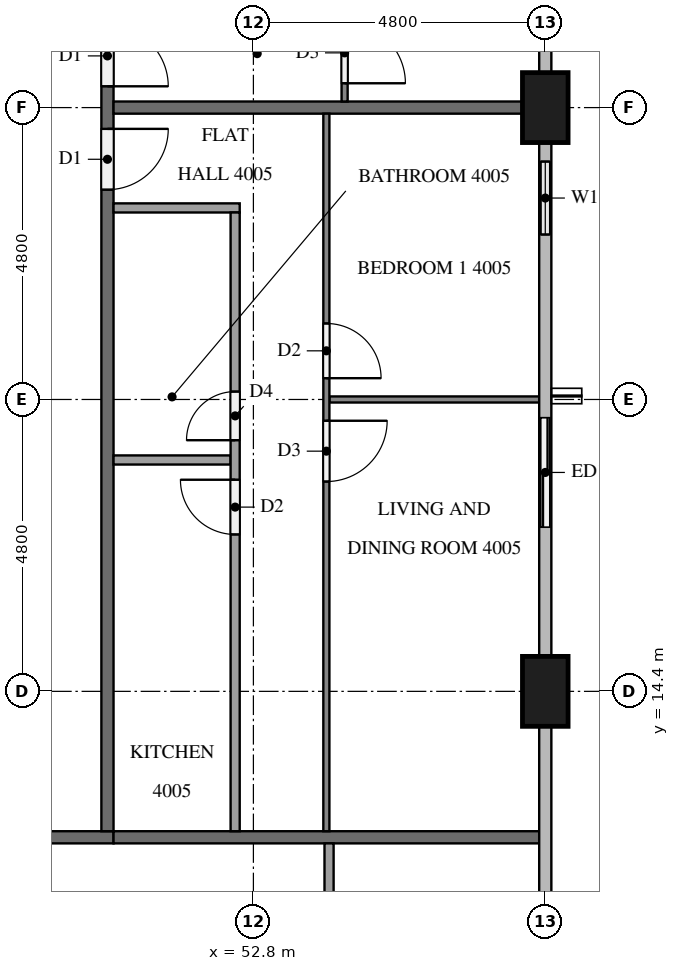
"""IFC4 building model, lengths in metres.
Left out: names, types, materials, properties, quantities, classifications, styles, units other than length and angle.
Written with IfcOpenShell. Run it as: python <this file> out.ifc"""

import sys

from ifc_helpers import new_model, si_unit, direction, frame, frame_2d, origin, origin_2d, place, context, subcontext, project, spatial, rectangle, extrude, element, fill, save


model = new_model("IFC4")
c1 = context("Model", 3, precision=1e-05, world=origin(), true_north=direction((0.0, 1.0)))
c2 = subcontext(c1, "Body", "Model", "MODEL_VIEW")
j1 = project(units=[si_unit("LENGTHUNIT", "METRE"), si_unit("PLANEANGLEUNIT", "RADIAN")], contexts=[c1])
p1 = place(None, origin())
s1 = spatial("IfcSite", under=j1, at=p1, CompositionType="ELEMENT")
p2 = place(p1, origin())
s2 = spatial("IfcBuilding", under=s1, at=p2, CompositionType="ELEMENT")
p3 = place(p2, frame((0.0, 0.0, 156.0)))
s3 = spatial("IfcBuildingStorey", under=s2, at=p3, CompositionType="ELEMENT", Elevation=156.0)
for number, where, z_axis, x_axis in (
    (1, (57.6, 14.4, 0.0), (0.0, 0.0, 1.0), (0.0, 1.0, 0.0)),
    (2, (57.6, 24.0, 0.0), (0.0, 0.0, 1.0), (0.0, 1.0, 0.0)),
):
    element("IfcColumn", number, at=place(p3, frame(where, z_axis=z_axis, x_axis=x_axis)), inside=s3, PredefinedType="COLUMN", context=c2, shape_type="SweptSolid", body=[
        extrude(rectangle(XDim=1.15, YDim=0.75, at=origin_2d()), origin(), (0.0, 0.0, 1.0), 3.2),
    ])
p4 = place(p3, frame((57.6, 16.8, 0.0), z_axis=(0.0, 0.0, 1.0), x_axis=(0.0, 1.0, 0.0)))
e3 = element("IfcWall", 3, at=p4, inside=s3, PredefinedType="SOLIDWALL", context=c2, shape_type="SweptSolid", body=[
    extrude(rectangle(XDim=2.4, YDim=0.15, at=frame_2d((1.2, 0.0))), origin(), (0.0, 0.0, 1.0), 3.2),
])
p5 = place(p4, frame((0.3, 0.0, 0.0)))
e4 = element("IfcOpeningElement", 4, at=p5, cuts=e3, PredefinedType="OPENING", context=c2, shape_type="SweptSolid", body=[
    extrude(rectangle(XDim=1.8, YDim=2.4, at=frame_2d((0.9, 1.2))), frame((0.0, 0.085, 0.0), z_axis=(0.0, -1.0, 0.0), x_axis=(1.0, 0.0, 0.0)), (0.0, 0.0, 1.0), 0.17),
])
p6 = place(p3, frame((57.6, 21.6, 0.0), z_axis=(0.0, 0.0, 1.0), x_axis=(0.0, 1.0, 0.0)))
e5 = element("IfcWall", 5, at=p6, inside=s3, PredefinedType="SOLIDWALL", context=c2, shape_type="SweptSolid", body=[
    extrude(rectangle(XDim=1.825, YDim=0.15, at=frame_2d((0.913, 0.0))), origin(), (0.0, 0.0, 1.0), 3.2),
])
p7 = place(p6, frame((0.312, 0.0, 0.9)))
e6 = element("IfcOpeningElement", 6, at=p7, cuts=e5, PredefinedType="OPENING", context=c2, shape_type="SweptSolid", body=[
    extrude(rectangle(XDim=1.2, YDim=1.4, at=frame_2d((0.6, 0.7))), frame((0.0, 0.085, 0.0), z_axis=(0.0, -1.0, 0.0), x_axis=(1.0, 0.0, 0.0)), (0.0, 0.0, 1.0), 0.17),
])
p8 = place(p3, frame((50.5, 12.0, 0.0), z_axis=(0.0, 0.0, 1.0), x_axis=(-1.0, 0.0, 0.0)))
e7 = element("IfcWall", 7, at=p8, inside=s3, PredefinedType="PARTITIONING", context=c2, shape_type="SweptSolid", body=[
    extrude(rectangle(XDim=38.6, YDim=0.2, at=frame_2d((19.3, 0.0))), origin(), (0.0, 0.0, 1.0), 3.2),
])
p9 = place(p8, frame((36.45, 0.0, 0.0)))
e8 = element("IfcOpeningElement", 8, at=p9, cuts=e7, PredefinedType="OPENING", context=c2, shape_type="SweptSolid", body=[
    extrude(rectangle(XDim=1.0, YDim=2.1, at=frame_2d((0.5, 1.05))), frame((0.0, 0.11, 0.0), z_axis=(0.0, -1.0, 0.0), x_axis=(1.0, 0.0, 0.0)), (0.0, 0.0, 1.0), 0.22),
])
p10 = place(p8, frame((34.75, 0.0, 0.0)))
e9 = element("IfcOpeningElement", 9, at=p10, cuts=e7, PredefinedType="OPENING", context=c2, shape_type="SweptSolid", body=[
    extrude(rectangle(XDim=1.0, YDim=2.1, at=frame_2d((0.5, 1.05))), frame((0.0, 0.11, 0.0), z_axis=(0.0, -1.0, 0.0), x_axis=(1.0, 0.0, 0.0)), (0.0, 0.0, 1.0), 0.22),
])
p11 = place(p8, frame((10.05, 0.0, 0.0)))
e10 = element("IfcOpeningElement", 10, at=p11, cuts=e7, PredefinedType="OPENING", context=c2, shape_type="SweptSolid", body=[
    extrude(rectangle(XDim=1.0, YDim=2.1, at=frame_2d((0.5, 1.05))), frame((0.0, 0.11, 0.0), z_axis=(0.0, -1.0, 0.0), x_axis=(1.0, 0.0, 0.0)), (0.0, 0.0, 1.0), 0.22),
])
p12 = place(p8, frame((8.35, 0.0, 0.0)))
e11 = element("IfcOpeningElement", 11, at=p12, cuts=e7, PredefinedType="OPENING", context=c2, shape_type="SweptSolid", body=[
    extrude(rectangle(XDim=1.0, YDim=2.1, at=frame_2d((0.5, 1.05))), frame((0.0, 0.11, 0.0), z_axis=(0.0, -1.0, 0.0), x_axis=(1.0, 0.0, 0.0)), (0.0, 0.0, 1.0), 0.22),
])
p13 = place(p3, frame((50.4, 40.7, 0.0), z_axis=(0.0, 0.0, 1.0), x_axis=(0.0, -1.0, 0.0)))
e12 = element("IfcWall", 12, at=p13, inside=s3, PredefinedType="PARTITIONING", context=c2, shape_type="SweptSolid", body=[
    extrude(rectangle(XDim=28.6, YDim=0.2, at=frame_2d((14.3, 0.0))), origin(), (0.0, 0.0, 1.0), 3.2),
])
p14 = place(p13, frame((17.05, 0.0, 0.0)))
e13 = element("IfcOpeningElement", 13, at=p14, cuts=e12, PredefinedType="OPENING", context=c2, shape_type="SweptSolid", body=[
    extrude(rectangle(XDim=1.0, YDim=2.1, at=frame_2d((0.5, 1.05))), frame((0.0, 0.11, 0.0), z_axis=(0.0, -1.0, 0.0), x_axis=(1.0, 0.0, 0.0)), (0.0, 0.0, 1.0), 0.22),
])
p15 = place(p13, frame((15.35, 0.0, 0.0)))
e14 = element("IfcOpeningElement", 14, at=p15, cuts=e12, PredefinedType="OPENING", context=c2, shape_type="SweptSolid", body=[
    extrude(rectangle(XDim=1.0, YDim=2.1, at=frame_2d((0.5, 1.05))), frame((0.0, 0.11, 0.0), z_axis=(0.0, -1.0, 0.0), x_axis=(1.0, 0.0, 0.0)), (0.0, 0.0, 1.0), 0.22),
])
p16 = place(p13, frame((5.75, 0.0, 0.0)))
e15 = element("IfcOpeningElement", 15, at=p16, cuts=e12, PredefinedType="OPENING", context=c2, shape_type="SweptSolid", body=[
    extrude(rectangle(XDim=1.0, YDim=2.1, at=frame_2d((0.5, 1.05))), frame((0.0, 0.11, 0.0), z_axis=(0.0, -1.0, 0.0), x_axis=(1.0, 0.0, 0.0)), (0.0, 0.0, 1.0), 0.22),
])
p17 = place(p3, frame((50.5, 12.0, 0.0), z_axis=(0.0, 0.0, 1.0), x_axis=(1.0, 0.0, 0.0)))
e16 = element("IfcWall", 16, at=p17, inside=s3, PredefinedType="PARTITIONING", context=c2, shape_type="SweptSolid", body=[
    extrude(rectangle(XDim=7.0, YDim=0.2, at=frame_2d((3.5, 0.0))), origin(), (0.0, 0.0, 1.0), 3.2),
])
p18 = place(p3, frame((50.5, 24.0, 0.0), z_axis=(0.0, 0.0, 1.0), x_axis=(1.0, 0.0, 0.0)))
e17 = element("IfcWall", 17, at=p18, inside=s3, PredefinedType="PARTITIONING", context=c2, shape_type="SweptSolid", body=[
    extrude(rectangle(XDim=6.725, YDim=0.2, at=frame_2d((3.363, 0.0))), origin(), (0.0, 0.0, 1.0), 3.2),
])
p19 = place(p3, frame((54.044, 11.9, 0.0), z_axis=(0.0, 0.0, 1.0), x_axis=(0.0, -1.0, 0.0)))
e18 = element("IfcWall", 18, at=p19, inside=s3, PredefinedType="PARTITIONING", context=c2, shape_type="SweptSolid", body=[
    extrude(rectangle(XDim=4.175, YDim=0.15, at=frame_2d((2.087, 0.0))), origin(), (0.0, 0.0, 1.0), 3.2),
])
p20 = place(p3, frame((54.05, 19.2, 0.0), z_axis=(0.0, 0.0, 1.0), x_axis=(1.0, 0.0, 0.0)))
e19 = element("IfcWall", 19, at=p20, inside=s3, PredefinedType="PARTITIONING", context=c2, shape_type="SweptSolid", body=[
    extrude(rectangle(XDim=3.45, YDim=0.1, at=frame_2d((1.725, 0.0))), origin(), (0.0, 0.0, 1.0), 3.2),
])
p21 = place(p3, frame((54.0, 23.9, 0.0), z_axis=(0.0, 0.0, 1.0), x_axis=(0.0, -1.0, 0.0)))
e20 = element("IfcWall", 20, at=p21, inside=s3, PredefinedType="PARTITIONING", context=c2, shape_type="SweptSolid", body=[
    extrude(rectangle(XDim=11.8, YDim=0.1, at=frame_2d((5.9, 0.0))), origin(), (0.0, 0.0, 1.0), 3.2),
])
p22 = place(p21, frame((3.45, 0.0, 0.0)))
e21 = element("IfcOpeningElement", 21, at=p22, cuts=e20, PredefinedType="OPENING", context=c2, shape_type="SweptSolid", body=[
    extrude(rectangle(XDim=0.9, YDim=2.1, at=frame_2d((0.45, 1.05))), frame((0.0, 0.06, 0.0), z_axis=(0.0, -1.0, 0.0), x_axis=(1.0, 0.0, 0.0)), (0.0, 0.0, 1.0), 0.12),
])
p23 = place(p21, frame((5.05, 0.0, 0.0)))
e22 = element("IfcOpeningElement", 22, at=p23, cuts=e20, PredefinedType="OPENING", context=c2, shape_type="SweptSolid", body=[
    extrude(rectangle(XDim=1.0, YDim=2.1, at=frame_2d((0.5, 1.05))), frame((0.0, 0.06, 0.0), z_axis=(0.0, -1.0, 0.0), x_axis=(1.0, 0.0, 0.0)), (0.0, 0.0, 1.0), 0.12),
])
p24 = place(p3, frame((50.5, 18.205, 0.0), z_axis=(0.0, 0.0, 1.0), x_axis=(1.0, 0.0, 0.0)))
e23 = element("IfcWall", 23, at=p24, inside=s3, PredefinedType="PARTITIONING", context=c2, shape_type="SweptSolid", body=[
    extrude(rectangle(XDim=1.925, YDim=0.15, at=frame_2d((0.962, 0.0))), origin(), (0.0, 0.0, 1.0), 3.2),
])
p25 = place(p3, frame((50.5, 22.35, 0.0), z_axis=(0.0, 0.0, 1.0), x_axis=(1.0, 0.0, 0.0)))
e24 = element("IfcWall", 24, at=p25, inside=s3, PredefinedType="PARTITIONING", context=c2, shape_type="SweptSolid", body=[
    extrude(rectangle(XDim=2.075, YDim=0.15, at=frame_2d((1.038, 0.0))), origin(), (0.0, 0.0, 1.0), 3.2),
])
p26 = place(p3, frame((52.5, 12.1, 0.0), z_axis=(0.0, 0.0, 1.0), x_axis=(0.0, 1.0, 0.0)))
e25 = element("IfcWall", 25, at=p26, inside=s3, PredefinedType="PARTITIONING", context=c2, shape_type="SweptSolid", body=[
    extrude(rectangle(XDim=10.175, YDim=0.15, at=frame_2d((5.087, 0.0))), origin(), (0.0, 0.0, 1.0), 3.2),
])
p27 = place(p26, frame((6.43, 0.0, 0.0)))
e26 = element("IfcOpeningElement", 26, at=p27, cuts=e25, PredefinedType="OPENING", context=c2, shape_type="SweptSolid", body=[
    extrude(rectangle(XDim=0.8, YDim=2.1, at=frame_2d((0.4, 1.05))), frame((0.0, 0.085, 0.0), z_axis=(0.0, -1.0, 0.0), x_axis=(1.0, 0.0, 0.0)), (0.0, 0.0, 1.0), 0.17),
])
p28 = place(p26, frame((4.88, 0.0, 0.0)))
e27 = element("IfcOpeningElement", 27, at=p28, cuts=e25, PredefinedType="OPENING", context=c2, shape_type="SweptSolid", body=[
    extrude(rectangle(XDim=0.9, YDim=2.1, at=frame_2d((0.45, 1.05))), frame((0.0, 0.085, 0.0), z_axis=(0.0, -1.0, 0.0), x_axis=(1.0, 0.0, 0.0)), (0.0, 0.0, 1.0), 0.17),
])
p29 = place(p3, frame((54.3, 33.5, 0.0), z_axis=(0.0, 0.0, 1.0), x_axis=(0.0, -1.0, 0.0)))
e28 = element("IfcWall", 28, at=p29, inside=s3, PredefinedType="PARTITIONING", context=c2, shape_type="SweptSolid", body=[
    extrude(rectangle(XDim=9.4, YDim=0.1, at=frame_2d((4.7, 0.0))), origin(), (0.0, 0.0, 1.0), 3.2),
])
p30 = place(p29, frame((8.1, 0.0, 0.0)))
e29 = element("IfcOpeningElement", 29, at=p30, cuts=e28, PredefinedType="OPENING", context=c2, shape_type="SweptSolid", body=[
    extrude(rectangle(XDim=1.0, YDim=2.1, at=frame_2d((0.5, 1.05))), frame((0.0, 0.06, 0.0), z_axis=(0.0, -1.0, 0.0), x_axis=(1.0, 0.0, 0.0)), (0.0, 0.0, 1.0), 0.12),
])
p31 = place(p29, frame((0.3, 0.0, 0.0)))
e30 = element("IfcOpeningElement", 30, at=p31, cuts=e28, PredefinedType="OPENING", context=c2, shape_type="SweptSolid", body=[
    extrude(rectangle(XDim=0.9, YDim=2.1, at=frame_2d((0.45, 1.05))), frame((0.0, 0.06, 0.0), z_axis=(0.0, -1.0, 0.0), x_axis=(1.0, 0.0, 0.0)), (0.0, 0.0, 1.0), 0.12),
])
p32 = place(p5, origin())
e31 = element("IfcDoor", 31, at=p32, inside=s3, OperationType="SLIDING_TO_LEFT", PredefinedType="DOOR", context=c2, shape_type="SweptSolid", body=[
    extrude(rectangle(XDim=1.8, YDim=2.4, at=frame_2d((0.9, 1.2))), frame((0.0, 0.025, 0.0), z_axis=(0.0, -1.0, 0.0), x_axis=(1.0, 0.0, 0.0)), (0.0, 0.0, 1.0), 0.05),
])
fill(e4, e31)
p33 = place(p7, origin())
e32 = element("IfcWindow", 32, at=p33, inside=s3, PartitioningType="SINGLE_PANEL", PredefinedType="WINDOW", context=c2, shape_type="SweptSolid", body=[
    extrude(rectangle(XDim=1.2, YDim=1.4, at=frame_2d((0.6, 0.7))), frame((0.0, 0.03, 0.0), z_axis=(0.0, -1.0, 0.0), x_axis=(1.0, 0.0, 0.0)), (0.0, 0.0, 1.0), 0.06),
])
fill(e6, e32)
p34 = place(p14, origin())
e33 = element("IfcDoor", 33, at=p34, inside=s3, OperationType="SINGLE_SWING_LEFT", PredefinedType="DOOR", context=c2, shape_type="SweptSolid", body=[
    extrude(rectangle(XDim=1.0, YDim=2.1, at=frame_2d((0.5, 1.05))), frame((0.0, 0.025, 0.0), z_axis=(0.0, -1.0, 0.0), x_axis=(1.0, 0.0, 0.0)), (0.0, 0.0, 1.0), 0.05),
])
fill(e13, e33)
p35 = place(p15, origin())
e34 = element("IfcDoor", 34, at=p35, inside=s3, OperationType="SINGLE_SWING_RIGHT", PredefinedType="DOOR", context=c2, shape_type="SweptSolid", body=[
    extrude(rectangle(XDim=1.0, YDim=2.1, at=frame_2d((0.5, 1.05))), frame((0.0, 0.025, 0.0), z_axis=(0.0, -1.0, 0.0), x_axis=(1.0, 0.0, 0.0)), (0.0, 0.0, 1.0), 0.05),
])
fill(e14, e34)
p36 = place(p22, origin())
e35 = element("IfcDoor", 35, at=p36, inside=s3, OperationType="SINGLE_SWING_RIGHT", PredefinedType="DOOR", context=c2, shape_type="SweptSolid", body=[
    extrude(rectangle(XDim=0.9, YDim=2.1, at=frame_2d((0.45, 1.05))), frame((0.0, 0.025, 0.0), z_axis=(0.0, -1.0, 0.0), x_axis=(1.0, 0.0, 0.0)), (0.0, 0.0, 1.0), 0.05),
])
fill(e21, e35)
p37 = place(p23, origin())
e36 = element("IfcDoor", 36, at=p37, inside=s3, OperationType="SINGLE_SWING_LEFT", PredefinedType="DOOR", context=c2, shape_type="SweptSolid", body=[
    extrude(rectangle(XDim=1.0, YDim=2.1, at=frame_2d((0.5, 1.05))), frame((0.0, 0.025, 0.0), z_axis=(0.0, -1.0, 0.0), x_axis=(1.0, 0.0, 0.0)), (0.0, 0.0, 1.0), 0.05),
])
fill(e22, e36)
p38 = place(p27, origin())
e37 = element("IfcDoor", 37, at=p38, inside=s3, OperationType="SINGLE_SWING_LEFT", PredefinedType="DOOR", context=c2, shape_type="SweptSolid", body=[
    extrude(rectangle(XDim=0.8, YDim=2.1, at=frame_2d((0.4, 1.05))), frame((0.0, 0.025, 0.0), z_axis=(0.0, -1.0, 0.0), x_axis=(1.0, 0.0, 0.0)), (0.0, 0.0, 1.0), 0.05),
])
fill(e26, e37)
p39 = place(p28, origin())
e38 = element("IfcDoor", 38, at=p39, inside=s3, OperationType="SINGLE_SWING_RIGHT", PredefinedType="DOOR", context=c2, shape_type="SweptSolid", body=[
    extrude(rectangle(XDim=0.9, YDim=2.1, at=frame_2d((0.45, 1.05))), frame((0.0, 0.025, 0.0), z_axis=(0.0, -1.0, 0.0), x_axis=(1.0, 0.0, 0.0)), (0.0, 0.0, 1.0), 0.05),
])
fill(e27, e38)
p40 = place(p30, origin())
e39 = element("IfcDoor", 39, at=p40, inside=s3, OperationType="SINGLE_SWING_RIGHT", PredefinedType="DOOR", context=c2, shape_type="SweptSolid", body=[
    extrude(rectangle(XDim=1.0, YDim=2.1, at=frame_2d((0.5, 1.05))), frame((0.0, 0.025, 0.0), z_axis=(0.0, -1.0, 0.0), x_axis=(1.0, 0.0, 0.0)), (0.0, 0.0, 1.0), 0.05),
])
fill(e29, e39)
save(model, sys.argv[1])
